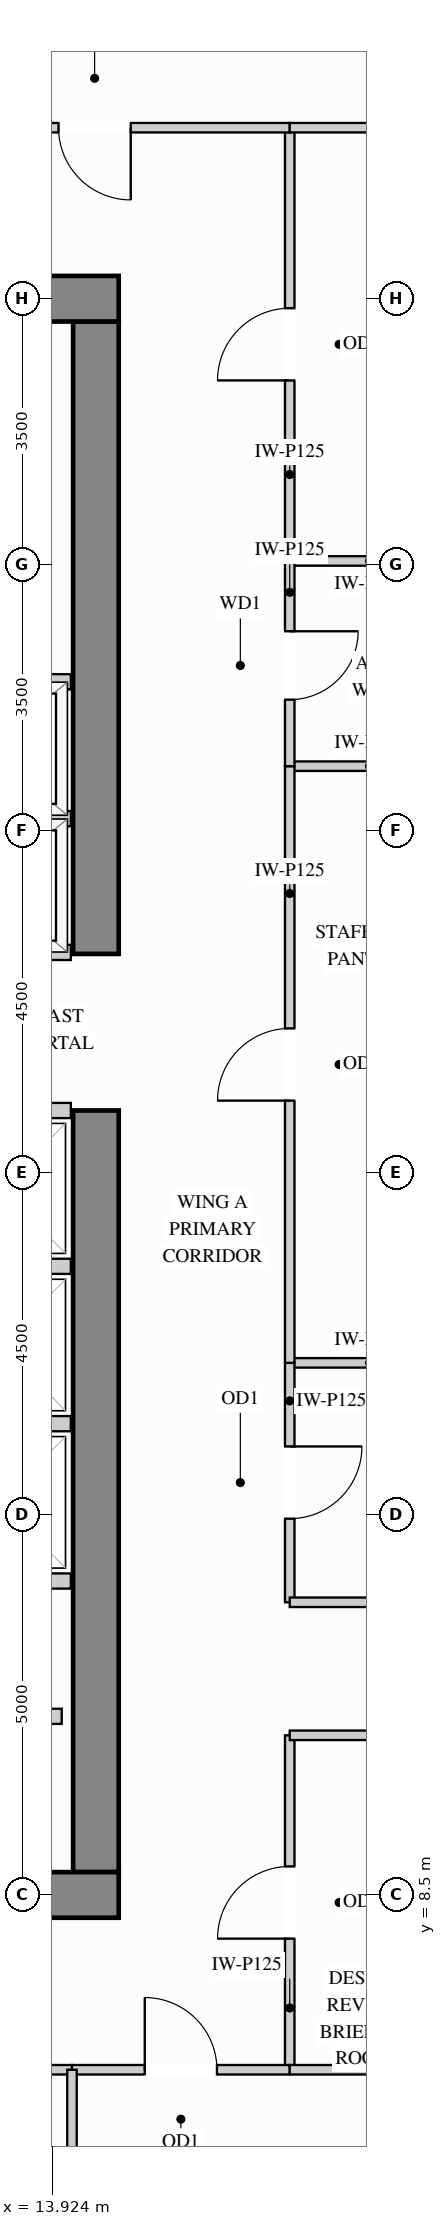
"""IFC4 building model, lengths in metres.
Left out: names, types, materials, properties, quantities, classifications, styles, units other than length and angle.
Written with IfcOpenShell. Run it as: python <this file> out.ifc"""

import sys

from ifc_helpers import new_model, si_unit, direction, frame, frame_2d, origin, place, context, subcontext, project, spatial, rectangle, extrude, source, transform, mapped, element, fill, save


model = new_model("IFC4")
c1 = context("Model", 3, precision=1e-05, world=origin(), true_north=direction((0.0, 1.0)))
c2 = subcontext(c1, "Body", "Model", "MODEL_VIEW")
j1 = project(units=[si_unit("LENGTHUNIT", "METRE"), si_unit("PLANEANGLEUNIT", "RADIAN")], contexts=[c1])
p1 = place(None, origin())
s1 = spatial("IfcSite", under=j1, at=p1, CompositionType="ELEMENT")
p2 = place(p1, origin())
s2 = spatial("IfcBuilding", under=s1, at=p2, CompositionType="ELEMENT")
p3 = place(p2, frame((0.0, 0.0, 150.3)))
s3 = spatial("IfcBuildingStorey", under=s2, at=p3, CompositionType="ELEMENT", Elevation=150.3)
m1 = source(origin(), c2, "Body", "SweptSolid", [
    extrude(rectangle(XDim=10.02, YDim=0.6, at=frame_2d((5.01, 0.0))), origin(), (0.0, 0.0, 1.0), 3.4),
])
p4 = place(p3, frame((14.5, 8.8, 0.0), z_axis=(0.0, 0.0, 1.0), x_axis=(0.0, 1.0, 0.0)))
e1 = element("IfcWall", 1, at=p4, inside=s3, PredefinedType="SHEAR", context=c2, shape_type="MappedRepresentation", body=[
    mapped(m1, transform((0.0, 0.0, 0.0), x_axis=(1.0, 0.0, 0.0), y_axis=(0.0, 1.0, 0.0), z_axis=(0.0, 0.0, 1.0))),
])
m2 = source(origin(), c2, "Body", "SweptSolid", [
    extrude(rectangle(XDim=8.32, YDim=0.6, at=frame_2d((4.16, 0.0))), origin(), (0.0, 0.0, 1.0), 3.4),
])
p5 = place(p3, frame((14.5, 20.88, 0.0), z_axis=(0.0, 0.0, 1.0), x_axis=(0.0, 1.0, 0.0)))
e2 = element("IfcWall", 2, at=p5, inside=s3, PredefinedType="SHEAR", context=c2, shape_type="MappedRepresentation", body=[
    mapped(m2, transform((0.0, 0.0, 0.0), x_axis=(1.0, 0.0, 0.0), y_axis=(0.0, 1.0, 0.0), z_axis=(0.0, 0.0, 1.0))),
])
m3 = source(origin(), c2, "Body", "SweptSolid", [
    extrude(rectangle(XDim=10.6, YDim=0.6, at=frame_2d((5.3, 0.0))), origin(), (0.0, 0.0, 1.0), 3.4),
])
for number, where, z_axis, x_axis in (
    (3, (4.2, 29.5, 0.0), (0.0, 0.0, 1.0), (1.0, 0.0, 0.0)),
    (4, (4.2, 8.5, 0.0), (0.0, 0.0, 1.0), (1.0, 0.0, 0.0)),
):
    element("IfcWall", number, at=place(p3, frame(where, z_axis=z_axis, x_axis=x_axis)), inside=s3, PredefinedType="SHEAR", context=c2, shape_type="MappedRepresentation", body=[
        mapped(m3, transform((0.0, 0.0, 0.0), x_axis=(1.0, 0.0, 0.0), y_axis=(0.0, 1.0, 0.0), z_axis=(0.0, 0.0, 1.0))),
    ])
m4 = source(origin(), c2, "Body", "SweptSolid", [
    extrude(rectangle(XDim=2.1, YDim=0.125, at=frame_2d((1.05, 0.0))), origin(), (0.0, 0.0, 1.0), 3.385),
])
p6 = place(p3, frame((17.05, 15.5, 0.0), z_axis=(0.0, 0.0, 1.0), x_axis=(1.0, 0.0, 0.0)))
e5 = element("IfcWall", 5, at=p6, inside=s3, PredefinedType="PARTITIONING", context=c2, shape_type="MappedRepresentation", body=[
    mapped(m4, transform((0.0, 0.0, 0.0), x_axis=(1.0, 0.0, 0.0), y_axis=(0.0, 1.0, 0.0), z_axis=(0.0, 0.0, 1.0))),
])
m5 = source(origin(), c2, "Body", "SweptSolid", [
    extrude(rectangle(XDim=2.098, YDim=0.125, at=frame_2d((1.049, 0.0))), origin(), (0.0, 0.0, 1.0), 3.385),
])
for number, where, z_axis, x_axis in (
    (6, (17.05, 23.35, 0.0), (0.0, 0.0, 1.0), (1.0, 0.0, 0.0)),
    (7, (17.05, 26.05, 0.0), (0.0, 0.0, 1.0), (1.0, 0.0, 0.0)),
):
    element("IfcWall", number, at=place(p3, frame(where, z_axis=z_axis, x_axis=x_axis)), inside=s3, PredefinedType="PARTITIONING", context=c2, shape_type="MappedRepresentation", body=[
        mapped(m5, transform((0.0, 0.0, 0.0), x_axis=(1.0, 0.0, 0.0), y_axis=(0.0, 1.0, 0.0), z_axis=(0.0, 0.0, 1.0))),
    ])
p7 = place(p3, frame((17.05, 12.35, 0.0), z_axis=(0.0, 0.0, 1.0), x_axis=(0.0, 1.0, 0.0)))
e8 = element("IfcWall", 8, at=p7, inside=s3, PredefinedType="PARTITIONING", context=c2, shape_type="SweptSolid", body=[
    extrude(rectangle(XDim=3.15, YDim=0.125, at=frame_2d((1.575, 0.0))), origin(), (0.0, 0.0, 1.0), 3.385),
])
p8 = place(p7, frame((1.1, 0.0, 0.0)))
e9 = element("IfcOpeningElement", 9, at=p8, cuts=e8, PredefinedType="OPENING", context=c2, shape_type="SweptSolid", body=[
    extrude(rectangle(XDim=0.95, YDim=2.15, at=frame_2d((0.475, 1.075))), frame((0.0, 0.073, 0.0), z_axis=(0.0, -1.0, 0.0), x_axis=(1.0, 0.0, 0.0)), (0.0, 0.0, 1.0), 0.145),
])
p9 = place(p3, frame((17.05, 15.5, 0.0), z_axis=(0.0, 0.0, 1.0), x_axis=(0.0, 1.0, 0.0)))
e10 = element("IfcWall", 10, at=p9, inside=s3, PredefinedType="PARTITIONING", context=c2, shape_type="SweptSolid", body=[
    extrude(rectangle(XDim=7.85, YDim=0.125, at=frame_2d((3.925, 0.0))), origin(), (0.0, 0.0, 1.0), 3.385),
])
p10 = place(p9, frame((3.45, 0.0, 0.0)))
e11 = element("IfcOpeningElement", 11, at=p10, cuts=e10, PredefinedType="OPENING", context=c2, shape_type="SweptSolid", body=[
    extrude(rectangle(XDim=0.95, YDim=2.15, at=frame_2d((0.475, 1.075))), frame((0.0, 0.073, 0.0), z_axis=(0.0, -1.0, 0.0), x_axis=(1.0, 0.0, 0.0)), (0.0, 0.0, 1.0), 0.145),
])
p11 = place(p3, frame((17.05, 26.05, 0.0), z_axis=(0.0, 0.0, 1.0), x_axis=(0.0, 1.0, 0.0)))
e12 = element("IfcWall", 12, at=p11, inside=s3, PredefinedType="PARTITIONING", context=c2, shape_type="SweptSolid", body=[
    extrude(rectangle(XDim=5.7, YDim=0.125, at=frame_2d((2.85, 0.0))), origin(), (0.0, 0.0, 1.0), 3.385),
])
p12 = place(p11, frame((2.375, 0.0, 0.0)))
e13 = element("IfcOpeningElement", 13, at=p12, cuts=e12, PredefinedType="OPENING", context=c2, shape_type="SweptSolid", body=[
    extrude(rectangle(XDim=0.95, YDim=2.15, at=frame_2d((0.475, 1.075))), frame((0.0, 0.073, 0.0), z_axis=(0.0, -1.0, 0.0), x_axis=(1.0, 0.0, 0.0)), (0.0, 0.0, 1.0), 0.145),
])
p13 = place(p3, frame((17.05, 6.2, 0.0), z_axis=(0.0, 0.0, 1.0), x_axis=(0.0, 1.0, 0.0)))
e14 = element("IfcWall", 14, at=p13, inside=s3, PredefinedType="PARTITIONING", context=c2, shape_type="SweptSolid", body=[
    extrude(rectangle(XDim=4.4, YDim=0.125, at=frame_2d((2.2, 0.0))), origin(), (0.0, 0.0, 1.0), 3.385),
])
p14 = place(p13, frame((1.725, 0.0, 0.0)))
e15 = element("IfcOpeningElement", 15, at=p14, cuts=e14, PredefinedType="OPENING", context=c2, shape_type="SweptSolid", body=[
    extrude(rectangle(XDim=0.95, YDim=2.15, at=frame_2d((0.475, 1.075))), frame((0.0, 0.073, 0.0), z_axis=(0.0, -1.0, 0.0), x_axis=(1.0, 0.0, 0.0)), (0.0, 0.0, 1.0), 0.145),
])
p15 = place(p3, frame((17.05, 23.35, 0.0), z_axis=(0.0, 0.0, 1.0), x_axis=(0.0, 1.0, 0.0)))
e16 = element("IfcWall", 16, at=p15, inside=s3, PredefinedType="PARTITIONING", context=c2, shape_type="SweptSolid", body=[
    extrude(rectangle(XDim=2.7, YDim=0.125, at=frame_2d((1.35, 0.0))), origin(), (0.0, 0.0, 1.0), 3.385),
])
p16 = place(p15, frame((0.875, 0.0, 0.0)))
e17 = element("IfcOpeningElement", 17, at=p16, cuts=e16, PredefinedType="OPENING", context=c2, shape_type="SweptSolid", body=[
    extrude(rectangle(XDim=0.9, YDim=2.15, at=frame_2d((0.45, 1.075))), frame((0.0, 0.073, 0.0), z_axis=(0.0, -1.0, 0.0), x_axis=(1.0, 0.0, 0.0)), (0.0, 0.0, 1.0), 0.145),
])
p17 = place(p3, frame((11.916, 31.75, 0.0), z_axis=(0.0, 0.0, 1.0), x_axis=(1.0, 0.0, 0.0)))
e18 = element("IfcWall", 18, at=p17, inside=s3, PredefinedType="PARTITIONING", context=c2, shape_type="SweptSolid", body=[
    extrude(rectangle(XDim=5.134, YDim=0.125, at=frame_2d((2.567, 0.0))), origin(), (0.0, 0.0, 1.0), 2.848),
])
p18 = place(p17, frame((2.092, 0.0, 0.0)))
e19 = element("IfcOpeningElement", 19, at=p18, cuts=e18, PredefinedType="OPENING", context=c2, shape_type="SweptSolid", body=[
    extrude(rectangle(XDim=0.95, YDim=2.15, at=frame_2d((0.475, 1.075))), frame((0.0, 0.073, 0.0), z_axis=(0.0, -1.0, 0.0), x_axis=(1.0, 0.0, 0.0)), (0.0, 0.0, 1.0), 0.145),
])
m6 = source(origin(), c2, "Body", "SweptSolid", [
    extrude(rectangle(XDim=2.098, YDim=0.125, at=frame_2d((1.049, 0.0))), origin(), (0.0, 0.0, 1.0), 2.848),
])
p19 = place(p3, frame((17.05, 31.75, 0.0), z_axis=(0.0, 0.0, 1.0), x_axis=(1.0, 0.0, 0.0)))
e20 = element("IfcWall", 20, at=p19, inside=s3, PredefinedType="PARTITIONING", context=c2, shape_type="MappedRepresentation", body=[
    mapped(m6, transform((0.0, 0.0, 0.0), x_axis=(1.0, 0.0, 0.0), y_axis=(0.0, 1.0, 0.0), z_axis=(0.0, 0.0, 1.0))),
])
m7 = source(origin(), c2, "Body", "SweptSolid", [
    extrude(rectangle(XDim=2.45, YDim=0.125, at=frame_2d((1.225, 0.0))), origin(), (0.0, 0.0, 1.0), 3.385),
])
for number, where, z_axis, x_axis in (
    (21, (17.05, 12.35, 0.0), (0.0, 0.0, 1.0), (1.0, 0.0, 0.0)),
    (22, (17.05, 10.6, 0.0), (0.0, 0.0, 1.0), (1.0, 0.0, 0.0)),
):
    element("IfcWall", number, at=place(p3, frame(where, z_axis=z_axis, x_axis=x_axis)), inside=s3, PredefinedType="PARTITIONING", context=c2, shape_type="MappedRepresentation", body=[
        mapped(m7, transform((0.0, 0.0, 0.0), x_axis=(1.0, 0.0, 0.0), y_axis=(0.0, 1.0, 0.0), z_axis=(0.0, 0.0, 1.0))),
    ])
p20 = place(p3, frame((10.544, 6.2, 0.0), z_axis=(0.0, 0.0, 1.0), x_axis=(1.0, 0.0, 0.0)))
e23 = element("IfcWall", 23, at=p20, inside=s3, PredefinedType="PARTITIONING", context=c2, shape_type="SweptSolid", body=[
    extrude(rectangle(XDim=3.641, YDim=0.125, at=frame_2d((1.821, 0.0))), origin(), (0.0, 0.0, 1.0), 2.848),
])
p21 = place(p20, frame((1.345, 0.0, 0.0)))
e24 = element("IfcOpeningElement", 24, at=p21, cuts=e23, PredefinedType="OPENING", context=c2, shape_type="SweptSolid", body=[
    extrude(rectangle(XDim=0.95, YDim=2.15, at=frame_2d((0.475, 1.075))), frame((0.0, 0.073, 0.0), z_axis=(0.0, -1.0, 0.0), x_axis=(1.0, 0.0, 0.0)), (0.0, 0.0, 1.0), 0.145),
])
p22 = place(p3, frame((14.185, 6.2, 0.0), z_axis=(0.0, 0.0, 1.0), x_axis=(1.0, 0.0, 0.0)))
e25 = element("IfcWall", 25, at=p22, inside=s3, PredefinedType="PARTITIONING", context=c2, shape_type="SweptSolid", body=[
    extrude(rectangle(XDim=2.865, YDim=0.125, at=frame_2d((1.433, 0.0))), origin(), (0.0, 0.0, 1.0), 2.848),
])
p23 = place(p22, frame((0.958, 0.0, 0.0)))
e26 = element("IfcOpeningElement", 26, at=p23, cuts=e25, PredefinedType="OPENING", context=c2, shape_type="SweptSolid", body=[
    extrude(rectangle(XDim=0.95, YDim=2.15, at=frame_2d((0.475, 1.075))), frame((0.0, 0.073, 0.0), z_axis=(0.0, -1.0, 0.0), x_axis=(1.0, 0.0, 0.0)), (0.0, 0.0, 1.0), 0.145),
])
m8 = source(origin(), c2, "Body", "SweptSolid", [
    extrude(rectangle(XDim=2.1, YDim=0.125, at=frame_2d((1.05, 0.0))), origin(), (0.0, 0.0, 1.0), 2.848),
])
p24 = place(p3, frame((17.05, 6.2, 0.0), z_axis=(0.0, 0.0, 1.0), x_axis=(1.0, 0.0, 0.0)))
e27 = element("IfcWall", 27, at=p24, inside=s3, PredefinedType="PARTITIONING", context=c2, shape_type="MappedRepresentation", body=[
    mapped(m8, transform((0.0, 0.0, 0.0), x_axis=(1.0, 0.0, 0.0), y_axis=(0.0, 1.0, 0.0), z_axis=(0.0, 0.0, 1.0))),
])
m9 = source(origin(), c2, "Body", "SweptSolid", [
    extrude(rectangle(XDim=5.08, YDim=0.125, at=frame_2d((2.54, 0.0))), origin(), (0.0, 0.0, 1.0), 3.385),
])
p25 = place(p3, frame((14.185, 1.12, 0.0), z_axis=(0.0, 0.0, 1.0), x_axis=(0.0, 1.0, 0.0)))
e28 = element("IfcWall", 28, at=p25, inside=s3, PredefinedType="PARTITIONING", context=c2, shape_type="MappedRepresentation", body=[
    mapped(m9, transform((0.0, 0.0, 0.0), x_axis=(1.0, 0.0, 0.0), y_axis=(0.0, 1.0, 0.0), z_axis=(0.0, 0.0, 1.0))),
])
m10 = source(origin(), c2, "Body", "SweptSolid", [
    extrude(rectangle(XDim=1.63, YDim=0.2, at=frame_2d((0.815, 0.0))), origin(), (0.0, 0.0, 1.0), 3.385),
])
p26 = place(p3, frame((12.42, 10.85, 0.0), z_axis=(0.0, 0.0, 1.0), x_axis=(1.0, 0.0, 0.0)))
e29 = element("IfcWall", 29, at=p26, inside=s3, PredefinedType="PARTITIONING", context=c2, shape_type="MappedRepresentation", body=[
    mapped(m10, transform((0.0, 0.0, 0.0), x_axis=(1.0, 0.0, 0.0), y_axis=(0.0, 1.0, 0.0), z_axis=(0.0, 0.0, 1.0))),
])
m11 = source(origin(), c2, "Body", "SweptSolid", [
    extrude(rectangle(XDim=2.34, YDim=0.2, at=frame_2d((1.17, 0.0))), origin(), (0.0, 0.0, 1.0), 3.385),
])
for number, where, z_axis, x_axis in (
    (30, (11.83, 22.66, 0.0), (0.0, 0.0, 1.0), (1.0, 0.0, 0.0)),
    (31, (11.83, 20.9, 0.0), (0.0, 0.0, 1.0), (1.0, 0.0, 0.0)),
    (32, (11.83, 24.46, 0.0), (0.0, 0.0, 1.0), (1.0, 0.0, 0.0)),
):
    element("IfcWall", number, at=place(p3, frame(where, z_axis=z_axis, x_axis=x_axis)), inside=s3, PredefinedType="PARTITIONING", context=c2, shape_type="MappedRepresentation", body=[
        mapped(m11, transform((0.0, 0.0, 0.0), x_axis=(1.0, 0.0, 0.0), y_axis=(0.0, 1.0, 0.0), z_axis=(0.0, 0.0, 1.0))),
    ])
m12 = source(origin(), c2, "Body", "SweptSolid", [
    extrude(rectangle(XDim=1.94, YDim=0.2, at=frame_2d((0.97, 0.0))), origin(), (0.0, 0.0, 1.0), 3.385),
])
for number, where, z_axis, x_axis in (
    (33, (12.23, 14.7, 0.0), (0.0, 0.0, 1.0), (1.0, 0.0, 0.0)),
    (34, (12.23, 12.63, 0.0), (0.0, 0.0, 1.0), (1.0, 0.0, 0.0)),
    (35, (12.23, 16.77, 0.0), (0.0, 0.0, 1.0), (1.0, 0.0, 0.0)),
    (36, (12.23, 18.82, 0.0), (0.0, 0.0, 1.0), (1.0, 0.0, 0.0)),
):
    element("IfcWall", number, at=place(p3, frame(where, z_axis=z_axis, x_axis=x_axis)), inside=s3, PredefinedType="PARTITIONING", context=c2, shape_type="MappedRepresentation", body=[
        mapped(m12, transform((0.0, 0.0, 0.0), x_axis=(1.0, 0.0, 0.0), y_axis=(0.0, 1.0, 0.0), z_axis=(0.0, 0.0, 1.0))),
    ])
m13 = source(origin(), c2, "Body", "SweptSolid", [
    extrude(rectangle(XDim=0.95, YDim=2.15, at=frame_2d((0.475, 1.075))), frame((0.0, 0.025, 0.0), z_axis=(0.0, -1.0, 0.0), x_axis=(1.0, 0.0, 0.0)), (0.0, 0.0, 1.0), 0.05),
])
p27 = place(p14, origin())
e37 = element("IfcDoor", 37, at=p27, inside=s3, OperationType="SINGLE_SWING_LEFT", PredefinedType="DOOR", context=c2, shape_type="MappedRepresentation", body=[
    mapped(m13, transform((0.0, 0.0, 0.0), x_axis=(1.0, 0.0, 0.0), y_axis=(0.0, 1.0, 0.0), z_axis=(0.0, 0.0, 1.0))),
])
fill(e15, e37)
p28 = place(p8, origin())
e38 = element("IfcDoor", 38, at=p28, inside=s3, OperationType="SINGLE_SWING_RIGHT", PredefinedType="DOOR", context=c2, shape_type="MappedRepresentation", body=[
    mapped(m13, transform((0.0, 0.0, 0.0), x_axis=(1.0, 0.0, 0.0), y_axis=(0.0, 1.0, 0.0), z_axis=(0.0, 0.0, 1.0))),
])
fill(e9, e38)
p29 = place(p10, origin())
e39 = element("IfcDoor", 39, at=p29, inside=s3, OperationType="SINGLE_SWING_LEFT", PredefinedType="DOOR", context=c2, shape_type="MappedRepresentation", body=[
    mapped(m13, transform((0.0, 0.0, 0.0), x_axis=(1.0, 0.0, 0.0), y_axis=(0.0, 1.0, 0.0), z_axis=(0.0, 0.0, 1.0))),
])
fill(e11, e39)
p30 = place(p12, origin())
e40 = element("IfcDoor", 40, at=p30, inside=s3, OperationType="SINGLE_SWING_LEFT", PredefinedType="DOOR", context=c2, shape_type="MappedRepresentation", body=[
    mapped(m13, transform((0.0, 0.0, 0.0), x_axis=(1.0, 0.0, 0.0), y_axis=(0.0, 1.0, 0.0), z_axis=(0.0, 0.0, 1.0))),
])
fill(e13, e40)
p31 = place(p18, origin())
e41 = element("IfcDoor", 41, at=p31, inside=s3, OperationType="SINGLE_SWING_RIGHT", PredefinedType="DOOR", context=c2, shape_type="MappedRepresentation", body=[
    mapped(m13, transform((0.0, 0.0, 0.0), x_axis=(1.0, 0.0, 0.0), y_axis=(0.0, 1.0, 0.0), z_axis=(0.0, 0.0, 1.0))),
])
fill(e19, e41)
p32 = place(p23, origin())
e42 = element("IfcDoor", 42, at=p32, inside=s3, OperationType="SINGLE_SWING_LEFT", PredefinedType="DOOR", context=c2, shape_type="MappedRepresentation", body=[
    mapped(m13, transform((0.0, 0.0, 0.0), x_axis=(1.0, 0.0, 0.0), y_axis=(0.0, 1.0, 0.0), z_axis=(0.0, 0.0, 1.0))),
])
fill(e26, e42)
m14 = source(origin(), c2, "Body", "SweptSolid", [
    extrude(rectangle(XDim=0.9, YDim=2.15, at=frame_2d((0.45, 1.075))), frame((0.0, 0.025, 0.0), z_axis=(0.0, -1.0, 0.0), x_axis=(1.0, 0.0, 0.0)), (0.0, 0.0, 1.0), 0.05),
])
p33 = place(p16, origin())
e43 = element("IfcDoor", 43, at=p33, inside=s3, OperationType="SINGLE_SWING_RIGHT", PredefinedType="DOOR", context=c2, shape_type="MappedRepresentation", body=[
    mapped(m14, transform((0.0, 0.0, 0.0), x_axis=(1.0, 0.0, 0.0), y_axis=(0.0, 1.0, 0.0), z_axis=(0.0, 0.0, 1.0))),
])
fill(e17, e43)
save(model, sys.argv[1])
